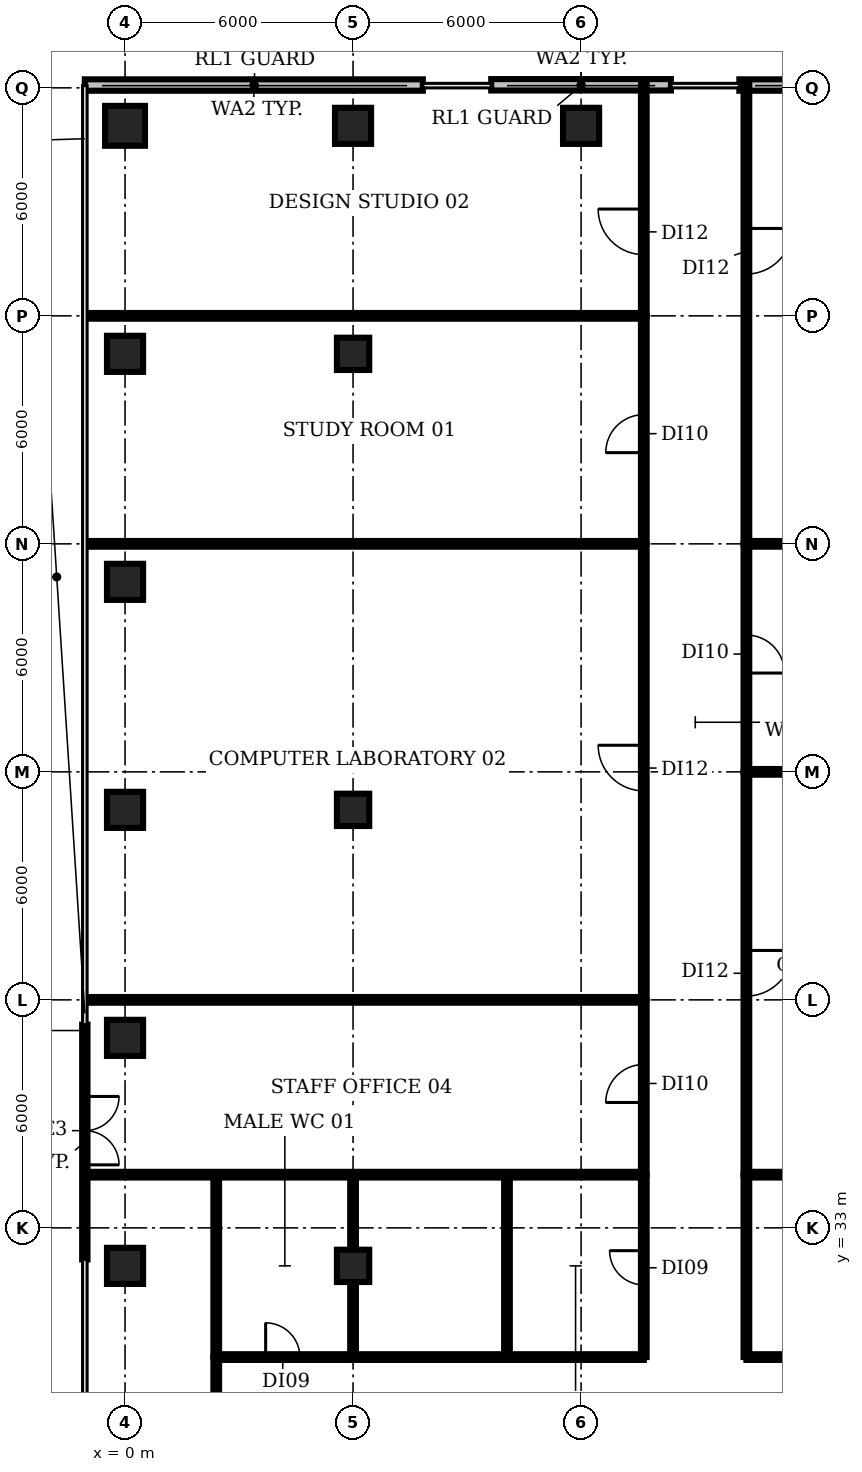
"""IFC4 building model, lengths in metres.
Left out: names, types, materials, properties, quantities, classifications, styles, units other than length and angle.
Written with IfcOpenShell. Run it as: python <this file> out.ifc"""

import sys

from ifc_helpers import new_model, si_unit, direction, frame, frame_2d, origin, origin_2d, place, context, subcontext, project, spatial, rectangle, circle, extrude, element, fill, save


model = new_model("IFC4")
c1 = context("Model", 3, precision=1e-05, world=origin(), true_north=direction((0.0, 1.0)))
c2 = subcontext(c1, "Body", "Model", "MODEL_VIEW")
j1 = project(units=[si_unit("LENGTHUNIT", "METRE"), si_unit("PLANEANGLEUNIT", "RADIAN")], contexts=[c1])
p1 = place(None, origin())
s1 = spatial("IfcSite", under=j1, at=p1, CompositionType="ELEMENT")
p2 = place(p1, origin())
s2 = spatial("IfcBuilding", under=s1, at=p2, CompositionType="ELEMENT")
p3 = place(p2, frame((0.0, 0.0, 62.6)))
s3 = spatial("IfcBuildingStorey", under=s2, at=p3, CompositionType="ELEMENT", Elevation=62.6)
for number, where, z_axis, x_axis in (
    (1, (0.0, 32.0, 0.0), (0.0, 0.0, 1.0), (1.0, 0.0, 0.0)),
    (2, (0.0, 38.0, 0.0), (0.0, 0.0, 1.0), (1.0, 0.0, 0.0)),
    (3, (0.0, 44.0, 0.0), (0.0, 0.0, 1.0), (1.0, 0.0, 0.0)),
    (4, (0.0, 50.0, 0.0), (0.0, 0.0, 1.0), (1.0, 0.0, 0.0)),
    (5, (0.0, 56.0, 0.0), (0.0, 0.0, 1.0), (1.0, 0.0, 0.0)),
):
    element("IfcColumn", number, at=place(p3, frame(where, z_axis=z_axis, x_axis=x_axis)), inside=s3, PredefinedType="COLUMN", context=c2, shape_type="SweptSolid", body=[
        extrude(rectangle(XDim=0.95, YDim=0.95, at=origin_2d()), origin(), (0.0, 0.0, 1.0), 3.85),
    ])
p4 = place(p3, frame((0.0, 62.0, 0.0), z_axis=(0.0, 0.0, 1.0), x_axis=(1.0, 0.0, 0.0)))
e6 = element("IfcColumn", 6, at=p4, inside=s3, PredefinedType="COLUMN", context=c2, shape_type="SweptSolid", body=[
    extrude(circle(Radius=0.525, at=origin_2d()), origin(), (0.0, 0.0, 1.0), 3.85),
])
for number, where, z_axis, x_axis in (
    (7, (6.0, 32.0, 0.0), (0.0, 0.0, 1.0), (1.0, 0.0, 0.0)),
    (8, (6.0, 44.0, 0.0), (0.0, 0.0, 1.0), (1.0, 0.0, 0.0)),
    (9, (6.0, 56.0, 0.0), (0.0, 0.0, 1.0), (1.0, 0.0, 0.0)),
):
    element("IfcColumn", number, at=place(p3, frame(where, z_axis=z_axis, x_axis=x_axis)), inside=s3, PredefinedType="COLUMN", context=c2, shape_type="SweptSolid", body=[
        extrude(rectangle(XDim=0.85, YDim=0.85, at=origin_2d()), origin(), (0.0, 0.0, 1.0), 3.85),
    ])
for number, where, z_axis, x_axis in (
    (10, (6.0, 62.0, 0.0), (0.0, 0.0, 1.0), (1.0, 0.0, 0.0)),
    (11, (12.0, 62.0, 0.0), (0.0, 0.0, 1.0), (1.0, 0.0, 0.0)),
):
    element("IfcColumn", number, at=place(p3, frame(where, z_axis=z_axis, x_axis=x_axis)), inside=s3, PredefinedType="COLUMN", context=c2, shape_type="SweptSolid", body=[
        extrude(rectangle(XDim=0.95, YDim=0.95, at=origin_2d()), origin(), (0.0, 0.0, 1.0), 3.85),
    ])
p5 = place(p3, frame((25.058, 63.074, 0.0), z_axis=(0.0, 0.0, 1.0), x_axis=(-1.0, 0.0, 0.0)))
e12 = element("IfcWall", 12, at=p5, inside=s3, PredefinedType="SOLIDWALL", context=c2, shape_type="SweptSolid", body=[
    extrude(rectangle(XDim=8.894, YDim=0.3, at=frame_2d((4.447, 0.0))), origin(), (0.0, 0.0, 1.0), 3.85),
])
p6 = place(p3, frame((14.365, 63.08, 0.0), z_axis=(0.0, 0.0, 1.0), x_axis=(-1.0, 0.0, 0.0)))
e13 = element("IfcWall", 13, at=p6, inside=s3, PredefinedType="SOLIDWALL", context=c2, shape_type="SweptSolid", body=[
    extrude(rectangle(XDim=4.729, YDim=0.3, at=frame_2d((2.365, 0.0))), origin(), (0.0, 0.0, 1.0), 3.85),
])
p7 = place(p3, frame((7.835, 63.074, 0.0), z_axis=(0.0, 0.0, 1.0), x_axis=(-1.0, 0.0, 0.0)))
e14 = element("IfcWall", 14, at=p7, inside=s3, PredefinedType="SOLIDWALL", context=c2, shape_type="SweptSolid", body=[
    extrude(rectangle(XDim=8.894, YDim=0.3, at=frame_2d((4.447, 0.0))), origin(), (0.0, 0.0, 1.0), 3.85),
])
p8 = place(p3, frame((-1.058, 38.347, 0.0), z_axis=(0.0, 0.0, 1.0), x_axis=(0.0, -1.0, 0.0)))
e15 = element("IfcWall", 15, at=p8, inside=s3, PredefinedType="SOLIDWALL", context=c2, shape_type="SweptSolid", body=[
    extrude(rectangle(XDim=6.178, YDim=0.14, at=frame_2d((3.089, 0.0))), origin(), (0.0, 0.0, 1.0), 3.85),
])
p9 = place(p8, frame((1.889, 0.0, 0.0)))
e16 = element("IfcOpeningElement", 16, at=p9, cuts=e15, PredefinedType="OPENING", context=c2, shape_type="SweptSolid", body=[
    extrude(rectangle(XDim=1.8, YDim=2.4, at=frame_2d((0.9, 1.2))), frame((0.0, 0.08, 0.0), z_axis=(0.0, -1.0, 0.0), x_axis=(1.0, 0.0, 0.0)), (0.0, 0.0, 1.0), 0.16),
])
for number, where, z_axis, x_axis in (
    (17, (-1.01, 34.4, 0.0), (0.0, 0.0, 1.0), (1.0, 0.0, 0.0)),
    (18, (-1.01, 39.0, 0.0), (0.0, 0.0, 1.0), (1.0, 0.0, 0.0)),
    (19, (-1.01, 51.0, 0.0), (0.0, 0.0, 1.0), (1.0, 0.0, 0.0)),
):
    element("IfcWall", number, at=place(p3, frame(where, z_axis=z_axis, x_axis=x_axis)), inside=s3, PredefinedType="PARTITIONING", context=c2, shape_type="SweptSolid", body=[
        extrude(rectangle(XDim=14.66, YDim=0.15, at=frame_2d((7.33, 0.0))), origin(), (0.0, 0.0, 1.0), 2.83),
    ])
p10 = place(p3, frame((-0.993, 57.0, 0.0), z_axis=(0.0, 0.0, 1.0), x_axis=(1.0, 0.0, 0.0)))
e20 = element("IfcWall", 20, at=p10, inside=s3, PredefinedType="PARTITIONING", context=c2, shape_type="SweptSolid", body=[
    extrude(rectangle(XDim=14.643, YDim=0.15, at=frame_2d((7.321, 0.0))), origin(), (0.0, 0.0, 1.0), 2.83),
])
p11 = place(p3, frame((2.4, 25.7, 0.0), z_axis=(0.0, 0.0, 1.0), x_axis=(0.0, 1.0, 0.0)))
e21 = element("IfcWall", 21, at=p11, inside=s3, PredefinedType="PARTITIONING", context=c2, shape_type="SweptSolid", body=[
    extrude(rectangle(XDim=3.9, YDim=0.15, at=frame_2d((1.95, 0.0))), origin(), (0.0, 0.0, 1.0), 2.83),
])
p12 = place(p3, frame((2.4, 29.6, 0.0), z_axis=(0.0, 0.0, 1.0), x_axis=(0.0, 1.0, 0.0)))
e22 = element("IfcWall", 22, at=p12, inside=s3, PredefinedType="PARTITIONING", context=c2, shape_type="SweptSolid", body=[
    extrude(rectangle(XDim=4.8, YDim=0.15, at=frame_2d((2.4, 0.0))), origin(), (0.0, 0.0, 1.0), 2.83),
])
p13 = place(p3, frame((2.4, 29.6, 0.0), z_axis=(0.0, 0.0, 1.0), x_axis=(1.0, 0.0, 0.0)))
e23 = element("IfcWall", 23, at=p13, inside=s3, PredefinedType="PARTITIONING", context=c2, shape_type="SweptSolid", body=[
    extrude(rectangle(XDim=3.6, YDim=0.15, at=frame_2d((1.8, 0.0))), origin(), (0.0, 0.0, 1.0), 2.83),
])
p14 = place(p13, frame((1.3, 0.0, 0.0)))
e24 = element("IfcOpeningElement", 24, at=p14, cuts=e23, PredefinedType="OPENING", context=c2, shape_type="SweptSolid", body=[
    extrude(rectangle(XDim=0.9, YDim=2.1, at=frame_2d((0.45, 1.05))), frame((0.0, 0.085, 0.0), z_axis=(0.0, -1.0, 0.0), x_axis=(1.0, 0.0, 0.0)), (0.0, 0.0, 1.0), 0.17),
])
p15 = place(p3, frame((6.0, 29.6, 0.0), z_axis=(0.0, 0.0, 1.0), x_axis=(0.0, 1.0, 0.0)))
e25 = element("IfcWall", 25, at=p15, inside=s3, PredefinedType="PARTITIONING", context=c2, shape_type="SweptSolid", body=[
    extrude(rectangle(XDim=4.8, YDim=0.15, at=frame_2d((2.4, 0.0))), origin(), (0.0, 0.0, 1.0), 2.83),
])
p16 = place(p3, frame((6.0, 29.6, 0.0), z_axis=(0.0, 0.0, 1.0), x_axis=(1.0, 0.0, 0.0)))
e26 = element("IfcWall", 26, at=p16, inside=s3, PredefinedType="PARTITIONING", context=c2, shape_type="SweptSolid", body=[
    extrude(rectangle(XDim=7.65, YDim=0.15, at=frame_2d((3.825, 0.0))), origin(), (0.0, 0.0, 1.0), 2.83),
])
p17 = place(p3, frame((10.05, 29.6, 0.0), z_axis=(0.0, 0.0, 1.0), x_axis=(0.0, 1.0, 0.0)))
e27 = element("IfcWall", 27, at=p17, inside=s3, PredefinedType="PARTITIONING", context=c2, shape_type="SweptSolid", body=[
    extrude(rectangle(XDim=4.8, YDim=0.15, at=frame_2d((2.4, 0.0))), origin(), (0.0, 0.0, 1.0), 2.83),
])
p18 = place(p3, frame((13.65, 29.6, 0.0), z_axis=(0.0, 0.0, 1.0), x_axis=(0.0, 1.0, 0.0)))
e28 = element("IfcWall", 28, at=p18, inside=s3, PredefinedType="PARTITIONING", context=c2, shape_type="SweptSolid", body=[
    extrude(rectangle(XDim=4.8, YDim=0.15, at=frame_2d((2.4, 0.0))), origin(), (0.0, 0.0, 1.0), 2.83),
])
p19 = place(p18, frame((1.9, 0.0, 0.0)))
e29 = element("IfcOpeningElement", 29, at=p19, cuts=e28, PredefinedType="OPENING", context=c2, shape_type="SweptSolid", body=[
    extrude(rectangle(XDim=0.9, YDim=2.1, at=frame_2d((0.45, 1.05))), frame((0.0, 0.085, 0.0), z_axis=(0.0, -1.0, 0.0), x_axis=(1.0, 0.0, 0.0)), (0.0, 0.0, 1.0), 0.17),
])
p20 = place(p3, frame((13.65, 34.4, 0.0), z_axis=(0.0, 0.0, 1.0), x_axis=(0.0, 1.0, 0.0)))
e30 = element("IfcWall", 30, at=p20, inside=s3, PredefinedType="PARTITIONING", context=c2, shape_type="SweptSolid", body=[
    extrude(rectangle(XDim=4.6, YDim=0.15, at=frame_2d((2.3, 0.0))), origin(), (0.0, 0.0, 1.0), 2.83),
])
p21 = place(p20, frame((1.9, 0.0, 0.0)))
e31 = element("IfcOpeningElement", 31, at=p21, cuts=e30, PredefinedType="OPENING", context=c2, shape_type="SweptSolid", body=[
    extrude(rectangle(XDim=1.0, YDim=2.1, at=frame_2d((0.5, 1.05))), frame((0.0, 0.085, 0.0), z_axis=(0.0, -1.0, 0.0), x_axis=(1.0, 0.0, 0.0)), (0.0, 0.0, 1.0), 0.17),
])
p22 = place(p3, frame((13.65, 39.0, 0.0), z_axis=(0.0, 0.0, 1.0), x_axis=(0.0, 1.0, 0.0)))
e32 = element("IfcWall", 32, at=p22, inside=s3, PredefinedType="PARTITIONING", context=c2, shape_type="SweptSolid", body=[
    extrude(rectangle(XDim=12.0, YDim=0.15, at=frame_2d((6.0, 0.0))), origin(), (0.0, 0.0, 1.0), 2.83),
])
p23 = place(p22, frame((5.5, 0.0, 0.0)))
e33 = element("IfcOpeningElement", 33, at=p23, cuts=e32, PredefinedType="OPENING", context=c2, shape_type="SweptSolid", body=[
    extrude(rectangle(XDim=1.2, YDim=2.1, at=frame_2d((0.6, 1.05))), frame((0.0, 0.085, 0.0), z_axis=(0.0, -1.0, 0.0), x_axis=(1.0, 0.0, 0.0)), (0.0, 0.0, 1.0), 0.17),
])
p24 = place(p3, frame((13.65, 51.0, 0.0), z_axis=(0.0, 0.0, 1.0), x_axis=(0.0, 1.0, 0.0)))
e34 = element("IfcWall", 34, at=p24, inside=s3, PredefinedType="PARTITIONING", context=c2, shape_type="SweptSolid", body=[
    extrude(rectangle(XDim=6.0, YDim=0.15, at=frame_2d((3.0, 0.0))), origin(), (0.0, 0.0, 1.0), 2.83),
])
p25 = place(p24, frame((2.4, 0.0, 0.0)))
e35 = element("IfcOpeningElement", 35, at=p25, cuts=e34, PredefinedType="OPENING", context=c2, shape_type="SweptSolid", body=[
    extrude(rectangle(XDim=1.0, YDim=2.1, at=frame_2d((0.5, 1.05))), frame((0.0, 0.085, 0.0), z_axis=(0.0, -1.0, 0.0), x_axis=(1.0, 0.0, 0.0)), (0.0, 0.0, 1.0), 0.17),
])
p26 = place(p3, frame((13.65, 57.0, 0.0), z_axis=(0.0, 0.0, 1.0), x_axis=(0.0, 1.0, 0.0)))
e36 = element("IfcWall", 36, at=p26, inside=s3, PredefinedType="PARTITIONING", context=c2, shape_type="SweptSolid", body=[
    extrude(rectangle(XDim=6.118, YDim=0.15, at=frame_2d((3.059, 0.0))), origin(), (0.0, 0.0, 1.0), 2.83),
])
p27 = place(p26, frame((1.61, 0.0, 0.0)))
e37 = element("IfcOpeningElement", 37, at=p27, cuts=e36, PredefinedType="OPENING", context=c2, shape_type="SweptSolid", body=[
    extrude(rectangle(XDim=1.2, YDim=2.1, at=frame_2d((0.6, 1.05))), frame((0.0, 0.085, 0.0), z_axis=(0.0, -1.0, 0.0), x_axis=(1.0, 0.0, 0.0)), (0.0, 0.0, 1.0), 0.17),
])
p28 = place(p3, frame((16.35, 29.6, 0.0), z_axis=(0.0, 0.0, 1.0), x_axis=(0.0, 1.0, 0.0)))
e38 = element("IfcWall", 38, at=p28, inside=s3, PredefinedType="PARTITIONING", context=c2, shape_type="SweptSolid", body=[
    extrude(rectangle(XDim=4.8, YDim=0.15, at=frame_2d((2.4, 0.0))), origin(), (0.0, 0.0, 1.0), 2.83),
])
p29 = place(p3, frame((16.35, 29.6, 0.0), z_axis=(0.0, 0.0, 1.0), x_axis=(1.0, 0.0, 0.0)))
e39 = element("IfcWall", 39, at=p29, inside=s3, PredefinedType="PARTITIONING", context=c2, shape_type="SweptSolid", body=[
    extrude(rectangle(XDim=5.06, YDim=0.15, at=frame_2d((2.53, 0.0))), origin(), (0.0, 0.0, 1.0), 2.83),
])
p30 = place(p3, frame((16.35, 34.4, 0.0), z_axis=(0.0, 0.0, 1.0), x_axis=(1.0, 0.0, 0.0)))
e40 = element("IfcWall", 40, at=p30, inside=s3, PredefinedType="PARTITIONING", context=c2, shape_type="SweptSolid", body=[
    extrude(rectangle(XDim=8.66, YDim=0.15, at=frame_2d((4.33, 0.0))), origin(), (0.0, 0.0, 1.0), 2.83),
])
p31 = place(p3, frame((16.35, 45.0, 0.0), z_axis=(0.0, 0.0, 1.0), x_axis=(0.0, -1.0, 0.0)))
e41 = element("IfcWall", 41, at=p31, inside=s3, PredefinedType="PARTITIONING", context=c2, shape_type="SweptSolid", body=[
    extrude(rectangle(XDim=10.6, YDim=0.15, at=frame_2d((5.3, 0.0))), origin(), (0.0, 0.0, 1.0), 2.83),
])
p32 = place(p31, frame((4.7, 0.0, 0.0)))
e42 = element("IfcOpeningElement", 42, at=p32, cuts=e41, PredefinedType="OPENING", context=c2, shape_type="SweptSolid", body=[
    extrude(rectangle(XDim=1.2, YDim=2.1, at=frame_2d((0.6, 1.05))), frame((0.0, 0.085, 0.0), z_axis=(0.0, -1.0, 0.0), x_axis=(1.0, 0.0, 0.0)), (0.0, 0.0, 1.0), 0.17),
])
p33 = place(p3, frame((16.35, 45.0, 0.0), z_axis=(0.0, 0.0, 1.0), x_axis=(1.0, 0.0, 0.0)))
e43 = element("IfcWall", 43, at=p33, inside=s3, PredefinedType="PARTITIONING", context=c2, shape_type="SweptSolid", body=[
    extrude(rectangle(XDim=8.66, YDim=0.15, at=frame_2d((4.33, 0.0))), origin(), (0.0, 0.0, 1.0), 2.83),
])
p34 = place(p3, frame((16.35, 51.0, 0.0), z_axis=(0.0, 0.0, 1.0), x_axis=(0.0, -1.0, 0.0)))
e44 = element("IfcWall", 44, at=p34, inside=s3, PredefinedType="PARTITIONING", context=c2, shape_type="SweptSolid", body=[
    extrude(rectangle(XDim=6.0, YDim=0.15, at=frame_2d((3.0, 0.0))), origin(), (0.0, 0.0, 1.0), 2.83),
])
p35 = place(p34, frame((2.4, 0.0, 0.0)))
e45 = element("IfcOpeningElement", 45, at=p35, cuts=e44, PredefinedType="OPENING", context=c2, shape_type="SweptSolid", body=[
    extrude(rectangle(XDim=1.0, YDim=2.1, at=frame_2d((0.5, 1.05))), frame((0.0, 0.085, 0.0), z_axis=(0.0, -1.0, 0.0), x_axis=(1.0, 0.0, 0.0)), (0.0, 0.0, 1.0), 0.17),
])
p36 = place(p3, frame((16.35, 51.0, 0.0), z_axis=(0.0, 0.0, 1.0), x_axis=(1.0, 0.0, 0.0)))
e46 = element("IfcWall", 46, at=p36, inside=s3, PredefinedType="PARTITIONING", context=c2, shape_type="SweptSolid", body=[
    extrude(rectangle(XDim=8.66, YDim=0.15, at=frame_2d((4.33, 0.0))), origin(), (0.0, 0.0, 1.0), 2.83),
])
p37 = place(p3, frame((16.35, 63.118, 0.0), z_axis=(0.0, 0.0, 1.0), x_axis=(0.0, -1.0, 0.0)))
e47 = element("IfcWall", 47, at=p37, inside=s3, PredefinedType="PARTITIONING", context=c2, shape_type="SweptSolid", body=[
    extrude(rectangle(XDim=12.118, YDim=0.15, at=frame_2d((6.059, 0.0))), origin(), (0.0, 0.0, 1.0), 2.83),
])
p38 = place(p37, frame((3.818, 0.0, 0.0)))
e48 = element("IfcOpeningElement", 48, at=p38, cuts=e47, PredefinedType="OPENING", context=c2, shape_type="SweptSolid", body=[
    extrude(rectangle(XDim=1.2, YDim=2.1, at=frame_2d((0.6, 1.05))), frame((0.0, 0.085, 0.0), z_axis=(0.0, -1.0, 0.0), x_axis=(1.0, 0.0, 0.0)), (0.0, 0.0, 1.0), 0.17),
])
p39 = place(p9, origin())
e49 = element("IfcDoor", 49, at=p39, inside=s3, OperationType="DOUBLE_DOOR_DOUBLE_SWING", PredefinedType="DOOR", context=c2, shape_type="SweptSolid", body=[
    extrude(rectangle(XDim=1.8, YDim=2.4, at=frame_2d((0.9, 1.2))), frame((0.0, 0.025, 0.0), z_axis=(0.0, -1.0, 0.0), x_axis=(1.0, 0.0, 0.0)), (0.0, 0.0, 1.0), 0.05),
])
fill(e16, e49)
p40 = place(p14, origin())
e50 = element("IfcDoor", 50, at=p40, inside=s3, OperationType="SINGLE_SWING_LEFT", PredefinedType="DOOR", context=c2, shape_type="SweptSolid", body=[
    extrude(rectangle(XDim=0.9, YDim=2.1, at=frame_2d((0.45, 1.05))), frame((0.0, 0.025, 0.0), z_axis=(0.0, -1.0, 0.0), x_axis=(1.0, 0.0, 0.0)), (0.0, 0.0, 1.0), 0.05),
])
fill(e24, e50)
p41 = place(p19, origin())
e51 = element("IfcDoor", 51, at=p41, inside=s3, OperationType="SINGLE_SWING_RIGHT", PredefinedType="DOOR", context=c2, shape_type="SweptSolid", body=[
    extrude(rectangle(XDim=0.9, YDim=2.1, at=frame_2d((0.45, 1.05))), frame((0.0, 0.025, 0.0), z_axis=(0.0, -1.0, 0.0), x_axis=(1.0, 0.0, 0.0)), (0.0, 0.0, 1.0), 0.05),
])
fill(e29, e51)
p42 = place(p21, origin())
e52 = element("IfcDoor", 52, at=p42, inside=s3, OperationType="SINGLE_SWING_LEFT", PredefinedType="DOOR", context=c2, shape_type="SweptSolid", body=[
    extrude(rectangle(XDim=1.0, YDim=2.1, at=frame_2d((0.5, 1.05))), frame((0.0, 0.025, 0.0), z_axis=(0.0, -1.0, 0.0), x_axis=(1.0, 0.0, 0.0)), (0.0, 0.0, 1.0), 0.05),
])
fill(e31, e52)
p43 = place(p23, origin())
e53 = element("IfcDoor", 53, at=p43, inside=s3, OperationType="SINGLE_SWING_RIGHT", PredefinedType="DOOR", context=c2, shape_type="SweptSolid", body=[
    extrude(rectangle(XDim=1.2, YDim=2.1, at=frame_2d((0.6, 1.05))), frame((0.0, 0.025, 0.0), z_axis=(0.0, -1.0, 0.0), x_axis=(1.0, 0.0, 0.0)), (0.0, 0.0, 1.0), 0.05),
])
fill(e33, e53)
p44 = place(p25, origin())
e54 = element("IfcDoor", 54, at=p44, inside=s3, OperationType="SINGLE_SWING_LEFT", PredefinedType="DOOR", context=c2, shape_type="SweptSolid", body=[
    extrude(rectangle(XDim=1.0, YDim=2.1, at=frame_2d((0.5, 1.05))), frame((0.0, 0.025, 0.0), z_axis=(0.0, -1.0, 0.0), x_axis=(1.0, 0.0, 0.0)), (0.0, 0.0, 1.0), 0.05),
])
fill(e35, e54)
p45 = place(p27, origin())
e55 = element("IfcDoor", 55, at=p45, inside=s3, OperationType="SINGLE_SWING_RIGHT", PredefinedType="DOOR", context=c2, shape_type="SweptSolid", body=[
    extrude(rectangle(XDim=1.2, YDim=2.1, at=frame_2d((0.6, 1.05))), frame((0.0, 0.025, 0.0), z_axis=(0.0, -1.0, 0.0), x_axis=(1.0, 0.0, 0.0)), (0.0, 0.0, 1.0), 0.05),
])
fill(e37, e55)
p46 = place(p32, origin())
e56 = element("IfcDoor", 56, at=p46, inside=s3, OperationType="SINGLE_SWING_LEFT", PredefinedType="DOOR", context=c2, shape_type="SweptSolid", body=[
    extrude(rectangle(XDim=1.2, YDim=2.1, at=frame_2d((0.6, 1.05))), frame((0.0, 0.025, 0.0), z_axis=(0.0, -1.0, 0.0), x_axis=(1.0, 0.0, 0.0)), (0.0, 0.0, 1.0), 0.05),
])
fill(e42, e56)
p47 = place(p35, origin())
e57 = element("IfcDoor", 57, at=p47, inside=s3, OperationType="SINGLE_SWING_RIGHT", PredefinedType="DOOR", context=c2, shape_type="SweptSolid", body=[
    extrude(rectangle(XDim=1.0, YDim=2.1, at=frame_2d((0.5, 1.05))), frame((0.0, 0.025, 0.0), z_axis=(0.0, -1.0, 0.0), x_axis=(1.0, 0.0, 0.0)), (0.0, 0.0, 1.0), 0.05),
])
fill(e45, e57)
p48 = place(p38, origin())
e58 = element("IfcDoor", 58, at=p48, inside=s3, OperationType="SINGLE_SWING_LEFT", PredefinedType="DOOR", context=c2, shape_type="SweptSolid", body=[
    extrude(rectangle(XDim=1.2, YDim=2.1, at=frame_2d((0.6, 1.05))), frame((0.0, 0.025, 0.0), z_axis=(0.0, -1.0, 0.0), x_axis=(1.0, 0.0, 0.0)), (0.0, 0.0, 1.0), 0.05),
])
fill(e48, e58)
save(model, sys.argv[1])
